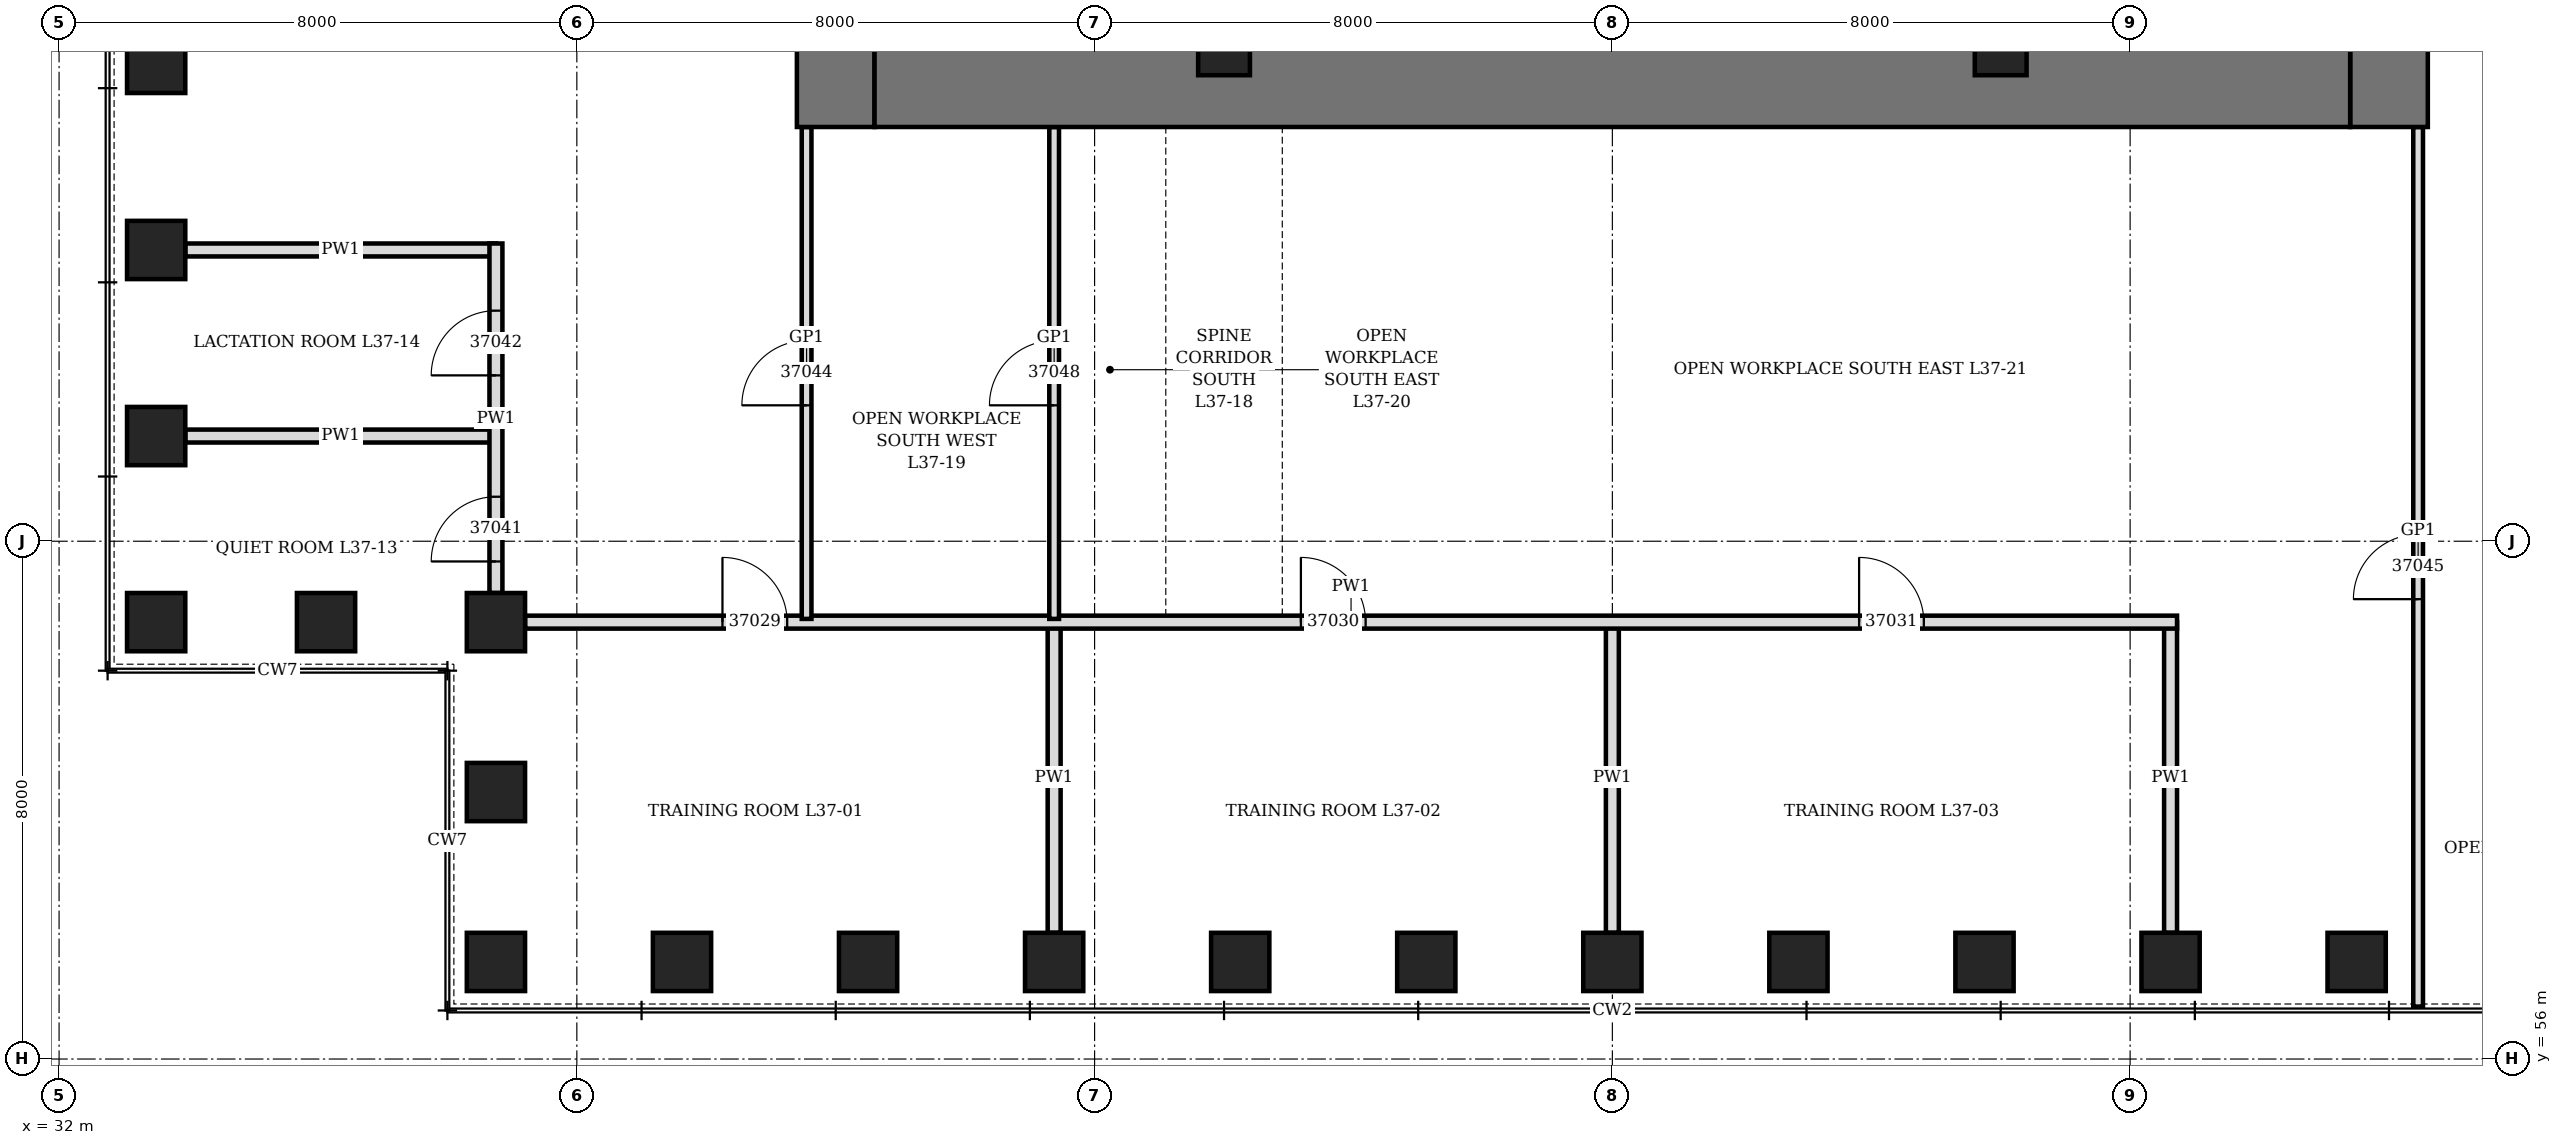
"""IFC4 building model, lengths in metres.
Left out: names, types, materials, properties, quantities, classifications, styles, units other than length and angle.
Written with IfcOpenShell. Run it as: python <this file> out.ifc"""

import sys

from ifc_helpers import new_model, si_unit, direction, frame, frame_2d, origin, origin_2d, place, context, subcontext, project, spatial, rectangle, hollow_rectangle, extrude, element, fill, save


model = new_model("IFC4")
c1 = context("Model", 3, precision=1e-05, world=origin(), true_north=direction((0.0, 1.0)))
c2 = subcontext(c1, "Body", "Model", "MODEL_VIEW")
j1 = project(units=[si_unit("LENGTHUNIT", "METRE"), si_unit("PLANEANGLEUNIT", "RADIAN")], contexts=[c1])
p1 = place(None, origin())
s1 = spatial("IfcSite", under=j1, at=p1, CompositionType="ELEMENT")
p2 = place(p1, origin())
s2 = spatial("IfcBuilding", under=s1, at=p2, CompositionType="ELEMENT")
p3 = place(p2, frame((0.0, 0.0, 166.9)))
s3 = spatial("IfcBuildingStorey", under=s2, at=p3, CompositionType="ELEMENT", Elevation=166.9)
for number, where, z_axis, x_axis in (
    (1, (38.75, 57.5, 0.0), (0.0, 0.0, 1.0), (1.0, 0.0, 0.0)),
    (2, (41.625, 57.5, 0.0), (0.0, 0.0, 1.0), (1.0, 0.0, 0.0)),
    (3, (44.5, 57.5, 0.0), (0.0, 0.0, 1.0), (1.0, 0.0, 0.0)),
    (4, (47.375, 57.5, 0.0), (0.0, 0.0, 1.0), (1.0, 0.0, 0.0)),
    (5, (50.25, 57.5, 0.0), (0.0, 0.0, 1.0), (1.0, 0.0, 0.0)),
    (6, (53.125, 57.5, 0.0), (0.0, 0.0, 1.0), (1.0, 0.0, 0.0)),
    (7, (56.0, 57.5, 0.0), (0.0, 0.0, 1.0), (1.0, 0.0, 0.0)),
    (8, (58.875, 57.5, 0.0), (0.0, 0.0, 1.0), (1.0, 0.0, 0.0)),
    (9, (61.75, 57.5, 0.0), (0.0, 0.0, 1.0), (1.0, 0.0, 0.0)),
    (10, (64.625, 57.5, 0.0), (0.0, 0.0, 1.0), (1.0, 0.0, 0.0)),
    (11, (67.5, 57.5, 0.0), (0.0, 0.0, 1.0), (1.0, 0.0, 0.0)),
    (12, (33.5, 71.375, 0.0), (0.0, 0.0, 1.0), (0.0, 1.0, 0.0)),
    (13, (33.5, 68.5, 0.0), (0.0, 0.0, 1.0), (0.0, 1.0, 0.0)),
    (14, (33.5, 65.625, 0.0), (0.0, 0.0, 1.0), (0.0, 1.0, 0.0)),
    (15, (33.5, 62.75, 0.0), (0.0, 0.0, 1.0), (1.0, 0.0, 0.0)),
    (16, (36.125, 62.75, 0.0), (0.0, 0.0, 1.0), (1.0, 0.0, 0.0)),
    (17, (38.75, 62.75, 0.0), (0.0, 0.0, 1.0), (0.0, 1.0, 0.0)),
    (18, (38.75, 60.125, 0.0), (0.0, 0.0, 1.0), (0.0, 1.0, 0.0)),
):
    element("IfcColumn", number, at=place(p3, frame(where, z_axis=z_axis, x_axis=x_axis)), inside=s3, PredefinedType="COLUMN", context=c2, shape_type="SweptSolid", body=[
        extrude(hollow_rectangle(XDim=0.9, YDim=0.9, WallThickness=0.12, at=origin_2d()), origin(), (0.0, 0.0, 1.0), 4.2),
    ])
p4 = place(p3, frame((44.0, 70.4, 0.0), z_axis=(0.0, 0.0, 1.0), x_axis=(0.0, 1.0, 0.0)))
e19 = element("IfcWall", 19, at=p4, inside=s3, PredefinedType="SHEAR", context=c2, shape_type="SweptSolid", body=[
    extrude(rectangle(XDim=19.2, YDim=1.2, at=frame_2d((9.6, 0.0))), origin(), (0.0, 0.0, 1.0), 4.2),
])
p5 = place(p4, frame((8.6, 0.0, 0.0)))
e20 = element("IfcOpeningElement", 20, at=p5, cuts=e19, PredefinedType="OPENING", context=c2, shape_type="SweptSolid", body=[
    extrude(rectangle(XDim=2.0, YDim=2.4, at=frame_2d((1.0, 1.2))), frame((0.0, 0.61, 0.0), z_axis=(0.0, -1.0, 0.0), x_axis=(1.0, 0.0, 0.0)), (0.0, 0.0, 1.0), 1.22),
])
p6 = place(p3, frame((68.0, 70.4, 0.0), z_axis=(0.0, 0.0, 1.0), x_axis=(0.0, 1.0, 0.0)))
e21 = element("IfcWall", 21, at=p6, inside=s3, PredefinedType="SHEAR", context=c2, shape_type="SweptSolid", body=[
    extrude(rectangle(XDim=19.2, YDim=1.2, at=frame_2d((9.6, 0.0))), origin(), (0.0, 0.0, 1.0), 4.2),
])
p7 = place(p6, frame((8.6, 0.0, 0.0)))
e22 = element("IfcOpeningElement", 22, at=p7, cuts=e21, PredefinedType="OPENING", context=c2, shape_type="SweptSolid", body=[
    extrude(rectangle(XDim=2.0, YDim=2.4, at=frame_2d((1.0, 1.2))), frame((0.0, 0.61, 0.0), z_axis=(0.0, -1.0, 0.0), x_axis=(1.0, 0.0, 0.0)), (0.0, 0.0, 1.0), 1.22),
])
p8 = place(p3, frame((44.6, 71.0, 0.0), z_axis=(0.0, 0.0, 1.0), x_axis=(1.0, 0.0, 0.0)))
e23 = element("IfcWall", 23, at=p8, inside=s3, PredefinedType="SHEAR", context=c2, shape_type="SweptSolid", body=[
    extrude(rectangle(XDim=22.8, YDim=1.2, at=frame_2d((11.4, 0.0))), origin(), (0.0, 0.0, 1.0), 4.2),
])
for number, where, z_axis, x_axis in (
    (24, (50.0, 71.6, 0.0), (0.0, 0.0, 1.0), (1.0, 0.0, 0.0)),
    (25, (62.0, 71.6, 0.0), (0.0, 0.0, 1.0), (1.0, 0.0, 0.0)),
):
    element("IfcColumn", number, at=place(p3, frame(where, z_axis=z_axis, x_axis=x_axis)), inside=s3, PredefinedType="COLUMN", context=c2, shape_type="SweptSolid", body=[
        extrude(hollow_rectangle(XDim=0.8, YDim=0.8, WallThickness=0.1, at=origin_2d()), origin(), (0.0, 0.0, 1.0), 4.2),
    ])
for number, where, z_axis, x_axis in (
    (26, (47.375, 57.95, 0.0), (0.0, 0.0, 1.0), (0.0, 1.0, 0.0)),
    (27, (56.0, 57.95, 0.0), (0.0, 0.0, 1.0), (0.0, 1.0, 0.0)),
    (28, (64.625, 57.95, 0.0), (0.0, 0.0, 1.0), (0.0, 1.0, 0.0)),
):
    element("IfcWall", number, at=place(p3, frame(where, z_axis=z_axis, x_axis=x_axis)), inside=s3, PredefinedType="PARTITIONING", context=c2, shape_type="SweptSolid", body=[
        extrude(rectangle(XDim=4.8, YDim=0.2, at=frame_2d((2.4, 0.0))), origin(), (0.0, 0.0, 1.0), 3.278),
    ])
for number, where, z_axis, x_axis in (
    (29, (33.95, 65.625, 0.0), (0.0, 0.0, 1.0), (1.0, 0.0, 0.0)),
    (30, (33.95, 68.5, 0.0), (0.0, 0.0, 1.0), (1.0, 0.0, 0.0)),
):
    element("IfcWall", number, at=place(p3, frame(where, z_axis=z_axis, x_axis=x_axis)), inside=s3, PredefinedType="PARTITIONING", context=c2, shape_type="SweptSolid", body=[
        extrude(rectangle(XDim=4.8, YDim=0.2, at=frame_2d((2.4, 0.0))), origin(), (0.0, 0.0, 1.0), 3.428),
    ])
p9 = place(p3, frame((39.2, 62.75, 0.0), z_axis=(0.0, 0.0, 1.0), x_axis=(1.0, 0.0, 0.0)))
e31 = element("IfcWall", 31, at=p9, inside=s3, PredefinedType="PARTITIONING", context=c2, shape_type="SweptSolid", body=[
    extrude(rectangle(XDim=25.525, YDim=0.2, at=frame_2d((12.763, 0.0))), origin(), (0.0, 0.0, 1.0), 4.04),
])
p10 = place(p9, frame((3.05, 0.0, 0.0)))
e32 = element("IfcOpeningElement", 32, at=p10, cuts=e31, PredefinedType="OPENING", context=c2, shape_type="SweptSolid", body=[
    extrude(rectangle(XDim=1.0, YDim=2.1, at=frame_2d((0.5, 1.05))), frame((0.0, 0.11, 0.0), z_axis=(0.0, -1.0, 0.0), x_axis=(1.0, 0.0, 0.0)), (0.0, 0.0, 1.0), 0.22),
])
p11 = place(p9, frame((11.988, 0.0, 0.0)))
e33 = element("IfcOpeningElement", 33, at=p11, cuts=e31, PredefinedType="OPENING", context=c2, shape_type="SweptSolid", body=[
    extrude(rectangle(XDim=1.0, YDim=2.1, at=frame_2d((0.5, 1.05))), frame((0.0, 0.11, 0.0), z_axis=(0.0, -1.0, 0.0), x_axis=(1.0, 0.0, 0.0)), (0.0, 0.0, 1.0), 0.22),
])
p12 = place(p9, frame((20.613, 0.0, 0.0)))
e34 = element("IfcOpeningElement", 34, at=p12, cuts=e31, PredefinedType="OPENING", context=c2, shape_type="SweptSolid", body=[
    extrude(rectangle(XDim=1.0, YDim=2.1, at=frame_2d((0.5, 1.05))), frame((0.0, 0.11, 0.0), z_axis=(0.0, -1.0, 0.0), x_axis=(1.0, 0.0, 0.0)), (0.0, 0.0, 1.0), 0.22),
])
p13 = place(p3, frame((38.75, 63.2, 0.0), z_axis=(0.0, 0.0, 1.0), x_axis=(0.0, 1.0, 0.0)))
e35 = element("IfcWall", 35, at=p13, inside=s3, PredefinedType="PARTITIONING", context=c2, shape_type="SweptSolid", body=[
    extrude(rectangle(XDim=5.4, YDim=0.2, at=frame_2d((2.7, 0.0))), origin(), (0.0, 0.0, 1.0), 4.04),
])
p14 = place(p13, frame((0.488, 0.0, 0.0)))
e36 = element("IfcOpeningElement", 36, at=p14, cuts=e35, PredefinedType="OPENING", context=c2, shape_type="SweptSolid", body=[
    extrude(rectangle(XDim=1.0, YDim=2.1, at=frame_2d((0.5, 1.05))), frame((0.0, 0.11, 0.0), z_axis=(0.0, -1.0, 0.0), x_axis=(1.0, 0.0, 0.0)), (0.0, 0.0, 1.0), 0.22),
])
p15 = place(p13, frame((3.363, 0.0, 0.0)))
e37 = element("IfcOpeningElement", 37, at=p15, cuts=e35, PredefinedType="OPENING", context=c2, shape_type="SweptSolid", body=[
    extrude(rectangle(XDim=1.0, YDim=2.1, at=frame_2d((0.5, 1.05))), frame((0.0, 0.11, 0.0), z_axis=(0.0, -1.0, 0.0), x_axis=(1.0, 0.0, 0.0)), (0.0, 0.0, 1.0), 0.22),
])
p16 = place(p3, frame((43.55, 62.8, 0.0), z_axis=(0.0, 0.0, 1.0), x_axis=(0.0, 1.0, 0.0)))
e38 = element("IfcWall", 38, at=p16, inside=s3, PredefinedType="PARTITIONING", context=c2, shape_type="SweptSolid", body=[
    extrude(rectangle(XDim=7.6, YDim=0.15, at=frame_2d((3.8, 0.0))), origin(), (0.0, 0.0, 1.0), 4.04),
])
p17 = place(p16, frame((3.3, 0.0, 0.0)))
e39 = element("IfcOpeningElement", 39, at=p17, cuts=e38, PredefinedType="OPENING", context=c2, shape_type="SweptSolid", body=[
    extrude(rectangle(XDim=1.0, YDim=2.4, at=frame_2d((0.5, 1.2))), frame((0.0, 0.085, 0.0), z_axis=(0.0, -1.0, 0.0), x_axis=(1.0, 0.0, 0.0)), (0.0, 0.0, 1.0), 0.17),
])
p18 = place(p3, frame((47.375, 62.8, 0.0), z_axis=(0.0, 0.0, 1.0), x_axis=(0.0, 1.0, 0.0)))
e40 = element("IfcWall", 40, at=p18, inside=s3, PredefinedType="PARTITIONING", context=c2, shape_type="SweptSolid", body=[
    extrude(rectangle(XDim=7.6, YDim=0.15, at=frame_2d((3.8, 0.0))), origin(), (0.0, 0.0, 1.0), 3.278),
])
p19 = place(p18, frame((3.3, 0.0, 0.0)))
e41 = element("IfcOpeningElement", 41, at=p19, cuts=e40, PredefinedType="OPENING", context=c2, shape_type="SweptSolid", body=[
    extrude(rectangle(XDim=1.0, YDim=2.4, at=frame_2d((0.5, 1.2))), frame((0.0, 0.085, 0.0), z_axis=(0.0, -1.0, 0.0), x_axis=(1.0, 0.0, 0.0)), (0.0, 0.0, 1.0), 0.17),
])
p20 = place(p3, frame((68.45, 56.81, 0.0), z_axis=(0.0, 0.0, 1.0), x_axis=(0.0, 1.0, 0.0)))
e42 = element("IfcWall", 42, at=p20, inside=s3, PredefinedType="PARTITIONING", context=c2, shape_type="SweptSolid", body=[
    extrude(rectangle(XDim=13.59, YDim=0.15, at=frame_2d((6.795, 0.0))), origin(), (0.0, 0.0, 1.0), 4.04),
])
p21 = place(p20, frame((6.295, 0.0, 0.0)))
e43 = element("IfcOpeningElement", 43, at=p21, cuts=e42, PredefinedType="OPENING", context=c2, shape_type="SweptSolid", body=[
    extrude(rectangle(XDim=1.0, YDim=2.4, at=frame_2d((0.5, 1.2))), frame((0.0, 0.085, 0.0), z_axis=(0.0, -1.0, 0.0), x_axis=(1.0, 0.0, 0.0)), (0.0, 0.0, 1.0), 0.17),
])
p22 = place(p10, origin())
e44 = element("IfcDoor", 44, at=p22, inside=s3, OperationType="SINGLE_SWING_LEFT", PredefinedType="DOOR", context=c2, shape_type="SweptSolid", body=[
    extrude(rectangle(XDim=1.0, YDim=2.1, at=frame_2d((0.5, 1.05))), frame((0.0, 0.1, 0.0), z_axis=(0.0, -1.0, 0.0), x_axis=(1.0, 0.0, 0.0)), (0.0, 0.0, 1.0), 0.199),
])
fill(e32, e44)
p23 = place(p11, origin())
e45 = element("IfcDoor", 45, at=p23, inside=s3, OperationType="SINGLE_SWING_LEFT", PredefinedType="DOOR", context=c2, shape_type="SweptSolid", body=[
    extrude(rectangle(XDim=1.0, YDim=2.1, at=frame_2d((0.5, 1.05))), frame((0.0, 0.1, 0.0), z_axis=(0.0, -1.0, 0.0), x_axis=(1.0, 0.0, 0.0)), (0.0, 0.0, 1.0), 0.199),
])
fill(e33, e45)
p24 = place(p12, origin())
e46 = element("IfcDoor", 46, at=p24, inside=s3, OperationType="SINGLE_SWING_LEFT", PredefinedType="DOOR", context=c2, shape_type="SweptSolid", body=[
    extrude(rectangle(XDim=1.0, YDim=2.1, at=frame_2d((0.5, 1.05))), frame((0.0, 0.1, 0.0), z_axis=(0.0, -1.0, 0.0), x_axis=(1.0, 0.0, 0.0)), (0.0, 0.0, 1.0), 0.199),
])
fill(e34, e46)
p25 = place(p14, origin())
e47 = element("IfcDoor", 47, at=p25, inside=s3, OperationType="SINGLE_SWING_LEFT", PredefinedType="DOOR", context=c2, shape_type="SweptSolid", body=[
    extrude(rectangle(XDim=1.0, YDim=2.1, at=frame_2d((0.5, 1.05))), frame((0.0, 0.1, 0.0), z_axis=(0.0, -1.0, 0.0), x_axis=(1.0, 0.0, 0.0)), (0.0, 0.0, 1.0), 0.199),
])
fill(e36, e47)
p26 = place(p15, origin())
e48 = element("IfcDoor", 48, at=p26, inside=s3, OperationType="SINGLE_SWING_LEFT", PredefinedType="DOOR", context=c2, shape_type="SweptSolid", body=[
    extrude(rectangle(XDim=1.0, YDim=2.1, at=frame_2d((0.5, 1.05))), frame((0.0, 0.1, 0.0), z_axis=(0.0, -1.0, 0.0), x_axis=(1.0, 0.0, 0.0)), (0.0, 0.0, 1.0), 0.199),
])
fill(e37, e48)
p27 = place(p17, origin())
e49 = element("IfcDoor", 49, at=p27, inside=s3, OperationType="SINGLE_SWING_RIGHT", PredefinedType="DOOR", context=c2, shape_type="SweptSolid", body=[
    extrude(rectangle(XDim=1.0, YDim=2.4, at=frame_2d((0.5, 1.2))), frame((0.0, 0.075, 0.0), z_axis=(0.0, -1.0, 0.0), x_axis=(1.0, 0.0, 0.0)), (0.0, 0.0, 1.0), 0.149),
])
fill(e39, e49)
p28 = place(p21, origin())
e50 = element("IfcDoor", 50, at=p28, inside=s3, OperationType="SINGLE_SWING_RIGHT", PredefinedType="DOOR", context=c2, shape_type="SweptSolid", body=[
    extrude(rectangle(XDim=1.0, YDim=2.4, at=frame_2d((0.5, 1.2))), frame((0.0, 0.075, 0.0), z_axis=(0.0, -1.0, 0.0), x_axis=(1.0, 0.0, 0.0)), (0.0, 0.0, 1.0), 0.149),
])
fill(e43, e50)
p29 = place(p19, origin())
e51 = element("IfcDoor", 51, at=p29, inside=s3, OperationType="SINGLE_SWING_RIGHT", PredefinedType="DOOR", context=c2, shape_type="SweptSolid", body=[
    extrude(rectangle(XDim=1.0, YDim=2.4, at=frame_2d((0.5, 1.2))), frame((0.0, 0.075, 0.0), z_axis=(0.0, -1.0, 0.0), x_axis=(1.0, 0.0, 0.0)), (0.0, 0.0, 1.0), 0.149),
])
fill(e41, e51)
save(model, sys.argv[1])
